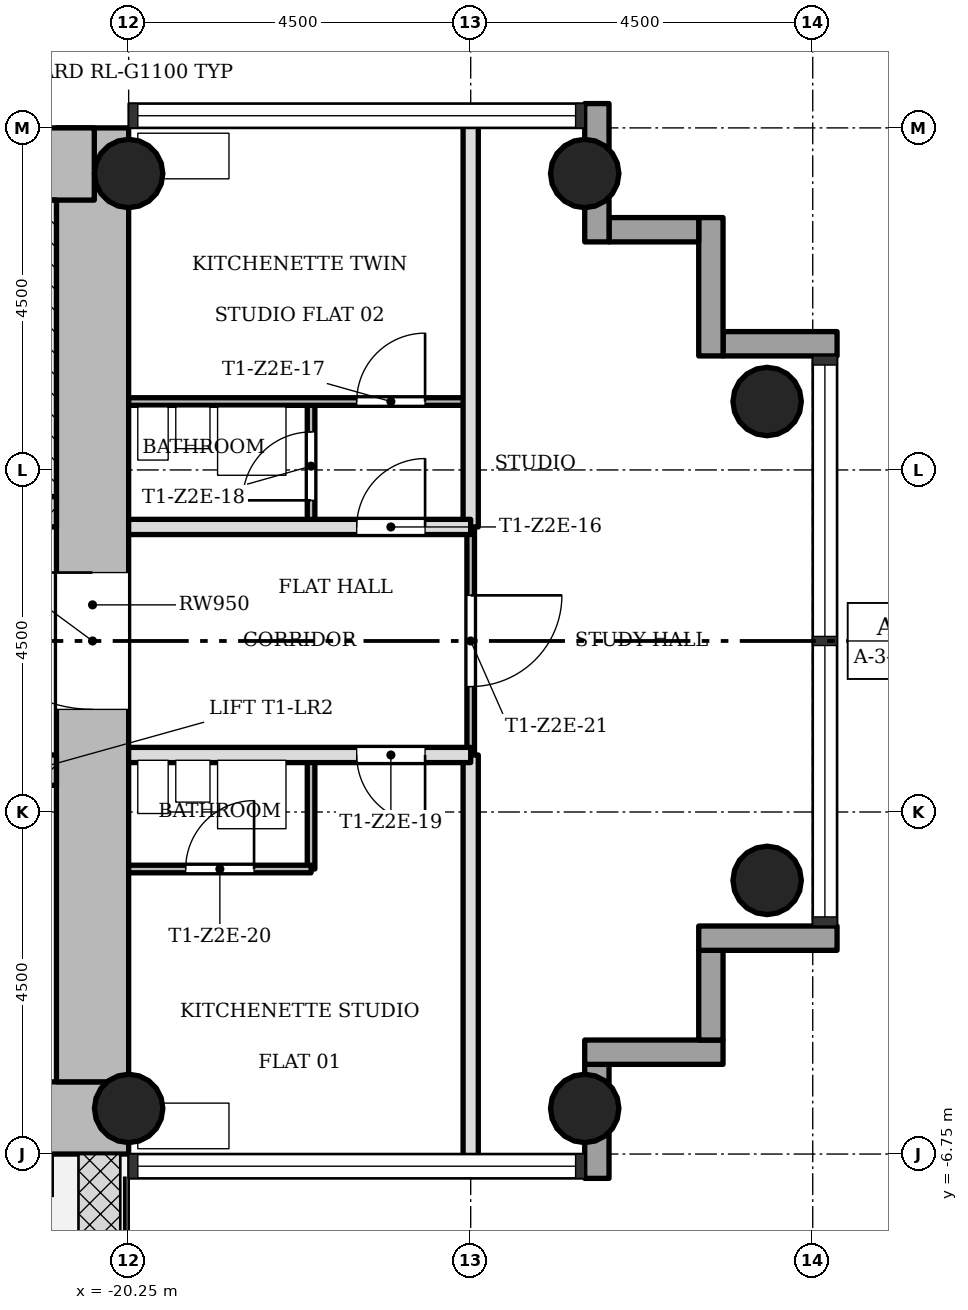
"""IFC4 building model, lengths in metres.
Left out: names, types, materials, properties, quantities, classifications, styles, units other than length and angle.
Written with IfcOpenShell. Run it as: python <this file> out.ifc"""

import sys

from ifc_helpers import new_model, si_unit, direction, frame, frame_2d, origin, origin_2d, place, context, subcontext, project, spatial, rectangle, hollow_circle, extrude, element, fill, save


model = new_model("IFC4")
c1 = context("Model", 3, precision=1e-05, world=origin(), true_north=direction((0.0, 1.0)))
c2 = subcontext(c1, "Body", "Model", "MODEL_VIEW")
j1 = project(units=[si_unit("LENGTHUNIT", "METRE"), si_unit("PLANEANGLEUNIT", "RADIAN")], contexts=[c1])
p1 = place(None, origin())
s1 = spatial("IfcSite", under=j1, at=p1, CompositionType="ELEMENT")
p2 = place(p1, origin())
s2 = spatial("IfcBuilding", under=s1, at=p2, CompositionType="ELEMENT")
p3 = place(p2, frame((0.0, 0.0, 103.8)))
s3 = spatial("IfcBuildingStorey", under=s2, at=p3, CompositionType="ELEMENT", Elevation=103.8)
p4 = place(p3, frame((-28.3, -6.275, 0.0), z_axis=(0.0, 0.0, 1.0), x_axis=(1.0, 0.0, 0.0)))
e1 = element("IfcWall", 1, at=p4, inside=s3, PredefinedType="SHEAR", context=c2, shape_type="SweptSolid", body=[
    extrude(rectangle(XDim=8.05, YDim=0.95, at=frame_2d((4.025, 0.0))), origin(), (0.0, 0.0, 1.0), 3.4),
])
p5 = place(p3, frame((-20.725, -5.8, 0.0), z_axis=(0.0, 0.0, 1.0), x_axis=(0.0, 1.0, 0.0)))
e2 = element("IfcWall", 2, at=p5, inside=s3, PredefinedType="SHEAR", context=c2, shape_type="SweptSolid", body=[
    extrude(rectangle(XDim=12.55, YDim=0.95, at=frame_2d((6.275, 0.0))), origin(), (0.0, 0.0, 1.0), 3.4),
])
p6 = place(p5, frame((4.9, 0.0, 0.0)))
e3 = element("IfcOpeningElement", 3, at=p6, cuts=e2, PredefinedType="OPENING", context=c2, shape_type="SweptSolid", body=[
    extrude(rectangle(XDim=1.8, YDim=2.1, at=frame_2d((0.9, 1.05))), frame((0.0, 0.485, 0.0), z_axis=(0.0, -1.0, 0.0), x_axis=(1.0, 0.0, 0.0)), (0.0, 0.0, 1.0), 0.97),
])
p7 = place(p3, frame((-20.702, 6.275, 0.0), z_axis=(0.0, 0.0, 1.0), x_axis=(-1.0, 0.0, 0.0)))
e4 = element("IfcWall", 4, at=p7, inside=s3, PredefinedType="SHEAR", context=c2, shape_type="SweptSolid", body=[
    extrude(rectangle(XDim=8.696, YDim=0.95, at=frame_2d((4.348, 0.0))), origin(), (0.0, 0.0, 1.0), 3.4),
])
p8 = place(p3, frame((-28.3, -1.7, 0.0), z_axis=(0.0, 0.0, 1.0), x_axis=(1.0, 0.0, 0.0)))
e5 = element("IfcWall", 5, at=p8, inside=s3, PredefinedType="SHEAR", context=c2, shape_type="SweptSolid", body=[
    extrude(rectangle(XDim=7.1, YDim=0.4, at=frame_2d((3.55, 0.0))), origin(), (0.0, 0.0, 1.0), 3.4),
])
p9 = place(p8, frame((0.8, 0.0, 0.0)))
e6 = element("IfcOpeningElement", 6, at=p9, cuts=e5, PredefinedType="OPENING", context=c2, shape_type="SweptSolid", body=[
    extrude(rectangle(XDim=1.1, YDim=2.1, at=frame_2d((0.55, 1.05))), frame((0.0, 0.21, 0.0), z_axis=(0.0, -1.0, 0.0), x_axis=(1.0, 0.0, 0.0)), (0.0, 0.0, 1.0), 0.42),
])
p10 = place(p8, frame((3.0, 0.0, 0.0)))
e7 = element("IfcOpeningElement", 7, at=p10, cuts=e5, PredefinedType="OPENING", context=c2, shape_type="SweptSolid", body=[
    extrude(rectangle(XDim=1.1, YDim=2.1, at=frame_2d((0.55, 1.05))), frame((0.0, 0.21, 0.0), z_axis=(0.0, -1.0, 0.0), x_axis=(1.0, 0.0, 0.0)), (0.0, 0.0, 1.0), 0.42),
])
p11 = place(p8, frame((5.2, 0.0, 0.0)))
e8 = element("IfcOpeningElement", 8, at=p11, cuts=e5, PredefinedType="OPENING", context=c2, shape_type="SweptSolid", body=[
    extrude(rectangle(XDim=1.1, YDim=2.1, at=frame_2d((0.55, 1.05))), frame((0.0, 0.21, 0.0), z_axis=(0.0, -1.0, 0.0), x_axis=(1.0, 0.0, 0.0)), (0.0, 0.0, 1.0), 0.42),
])
p12 = place(p3, frame((-28.3, 1.7, 0.0), z_axis=(0.0, 0.0, 1.0), x_axis=(1.0, 0.0, 0.0)))
e9 = element("IfcWall", 9, at=p12, inside=s3, PredefinedType="SHEAR", context=c2, shape_type="SweptSolid", body=[
    extrude(rectangle(XDim=7.1, YDim=0.4, at=frame_2d((3.55, 0.0))), origin(), (0.0, 0.0, 1.0), 3.4),
])
p13 = place(p12, frame((0.7, 0.0, 0.0)))
e10 = element("IfcOpeningElement", 10, at=p13, cuts=e9, PredefinedType="OPENING", context=c2, shape_type="SweptSolid", body=[
    extrude(rectangle(XDim=0.9, YDim=2.1, at=frame_2d((0.45, 1.05))), frame((0.0, 0.21, 0.0), z_axis=(0.0, -1.0, 0.0), x_axis=(1.0, 0.0, 0.0)), (0.0, 0.0, 1.0), 0.42),
])
for number, where, z_axis, x_axis in (
    (11, (-20.25, -6.15, 0.0), (0.0, 0.0, 1.0), (1.0, 0.0, 0.0)),
    (12, (-20.25, 6.15, 0.0), (0.0, 0.0, 1.0), (1.0, 0.0, 0.0)),
    (13, (-14.25, -6.15, 0.0), (0.0, 0.0, 1.0), (1.0, 0.0, 0.0)),
    (14, (-14.25, 6.15, 0.0), (0.0, 0.0, 1.0), (1.0, 0.0, 0.0)),
    (15, (-11.85, -3.15, 0.0), (0.0, 0.0, 1.0), (1.0, 0.0, 0.0)),
    (16, (-11.85, 3.15, 0.0), (0.0, 0.0, 1.0), (1.0, 0.0, 0.0)),
):
    element("IfcColumn", number, at=place(p3, frame(where, z_axis=z_axis, x_axis=x_axis)), inside=s3, PredefinedType="COLUMN", context=c2, shape_type="SweptSolid", body=[
        extrude(hollow_circle(Radius=0.45, WallThickness=0.032, at=origin_2d()), origin(), (0.0, 0.0, 1.0), 3.4),
    ])
p14 = place(p3, frame((-14.09, -7.07, -0.3), z_axis=(0.0, 0.0, 1.0), x_axis=(0.0, 1.0, 0.0)))
e17 = element("IfcWall", 17, at=p14, inside=s3, PredefinedType="STANDARD", context=c2, shape_type="SweptSolid", body=[
    extrude(rectangle(XDim=1.5, YDim=0.32, at=frame_2d((0.75, 0.0))), origin(), (0.0, 0.0, 1.0), 3.4),
])
p15 = place(p3, frame((-14.25, -5.41, -0.3), z_axis=(0.0, 0.0, 1.0), x_axis=(1.0, 0.0, 0.0)))
e18 = element("IfcWall", 18, at=p15, inside=s3, PredefinedType="STANDARD", context=c2, shape_type="SweptSolid", body=[
    extrude(rectangle(XDim=1.82, YDim=0.32, at=frame_2d((0.91, 0.0))), origin(), (0.0, 0.0, 1.0), 3.4),
])
p16 = place(p3, frame((-12.59, -5.25, -0.3), z_axis=(0.0, 0.0, 1.0), x_axis=(0.0, 1.0, 0.0)))
e19 = element("IfcWall", 19, at=p16, inside=s3, PredefinedType="STANDARD", context=c2, shape_type="SweptSolid", body=[
    extrude(rectangle(XDim=1.18, YDim=0.32, at=frame_2d((0.59, 0.0))), origin(), (0.0, 0.0, 1.0), 3.4),
])
p17 = place(p3, frame((-12.75, -3.91, -0.3), z_axis=(0.0, 0.0, 1.0), x_axis=(1.0, 0.0, 0.0)))
e20 = element("IfcWall", 20, at=p17, inside=s3, PredefinedType="STANDARD", context=c2, shape_type="SweptSolid", body=[
    extrude(rectangle(XDim=1.82, YDim=0.32, at=frame_2d((0.91, 0.0))), origin(), (0.0, 0.0, 1.0), 3.4),
])
p18 = place(p3, frame((-10.93, 3.91, -0.3), z_axis=(0.0, 0.0, 1.0), x_axis=(-1.0, 0.0, 0.0)))
e21 = element("IfcWall", 21, at=p18, inside=s3, PredefinedType="STANDARD", context=c2, shape_type="SweptSolid", body=[
    extrude(rectangle(XDim=1.5, YDim=0.32, at=frame_2d((0.75, 0.0))), origin(), (0.0, 0.0, 1.0), 3.4),
])
p19 = place(p3, frame((-12.59, 3.75, -0.3), z_axis=(0.0, 0.0, 1.0), x_axis=(0.0, 1.0, 0.0)))
e22 = element("IfcWall", 22, at=p19, inside=s3, PredefinedType="STANDARD", context=c2, shape_type="SweptSolid", body=[
    extrude(rectangle(XDim=1.82, YDim=0.32, at=frame_2d((0.91, 0.0))), origin(), (0.0, 0.0, 1.0), 3.4),
])
p20 = place(p3, frame((-12.75, 5.41, -0.3), z_axis=(0.0, 0.0, 1.0), x_axis=(-1.0, 0.0, 0.0)))
e23 = element("IfcWall", 23, at=p20, inside=s3, PredefinedType="STANDARD", context=c2, shape_type="SweptSolid", body=[
    extrude(rectangle(XDim=1.18, YDim=0.32, at=frame_2d((0.59, 0.0))), origin(), (0.0, 0.0, 1.0), 3.4),
])
p21 = place(p3, frame((-14.09, 5.25, -0.3), z_axis=(0.0, 0.0, 1.0), x_axis=(0.0, 1.0, 0.0)))
e24 = element("IfcWall", 24, at=p21, inside=s3, PredefinedType="STANDARD", context=c2, shape_type="SweptSolid", body=[
    extrude(rectangle(XDim=1.82, YDim=0.32, at=frame_2d((0.91, 0.0))), origin(), (0.0, 0.0, 1.0), 3.4),
])
p22 = place(p3, frame((-17.85, -3.0, 0.0), z_axis=(0.0, 0.0, 1.0), x_axis=(0.0, 1.0, 0.0)))
e25 = element("IfcWall", 25, at=p22, inside=s3, PredefinedType="PARTITIONING", context=c2, shape_type="SweptSolid", body=[
    extrude(rectangle(XDim=1.5, YDim=0.1, at=frame_2d((0.75, 0.0))), origin(), (0.0, 0.0, 1.0), 3.0),
])
p23 = place(p3, frame((-17.85, 1.5, 0.0), z_axis=(0.0, 0.0, 1.0), x_axis=(0.0, 1.0, 0.0)))
e26 = element("IfcWall", 26, at=p23, inside=s3, PredefinedType="PARTITIONING", context=c2, shape_type="SweptSolid", body=[
    extrude(rectangle(XDim=1.65, YDim=0.1, at=frame_2d((0.825, 0.0))), origin(), (0.0, 0.0, 1.0), 3.0),
])
p24 = place(p23, frame((0.35, 0.0, 0.0)))
e27 = element("IfcOpeningElement", 27, at=p24, cuts=e26, PredefinedType="OPENING", context=c2, shape_type="SweptSolid", body=[
    extrude(rectangle(XDim=0.9, YDim=2.1, at=frame_2d((0.45, 1.05))), frame((0.0, 0.06, 0.0), z_axis=(0.0, -1.0, 0.0), x_axis=(1.0, 0.0, 0.0)), (0.0, 0.0, 1.0), 0.12),
])
p25 = place(p3, frame((-15.75, -1.5, 0.0), z_axis=(0.0, 0.0, 1.0), x_axis=(0.0, 1.0, 0.0)))
e28 = element("IfcWall", 28, at=p25, inside=s3, PredefinedType="PARTITIONING", context=c2, shape_type="SweptSolid", body=[
    extrude(rectangle(XDim=3.0, YDim=0.1, at=frame_2d((1.5, 0.0))), origin(), (0.0, 0.0, 1.0), 3.0),
])
p26 = place(p25, frame((0.9, 0.0, 0.0)))
e29 = element("IfcOpeningElement", 29, at=p26, cuts=e28, PredefinedType="OPENING", context=c2, shape_type="SweptSolid", body=[
    extrude(rectangle(XDim=1.2, YDim=2.1, at=frame_2d((0.6, 1.05))), frame((0.0, 0.06, 0.0), z_axis=(0.0, -1.0, 0.0), x_axis=(1.0, 0.0, 0.0)), (0.0, 0.0, 1.0), 0.12),
])
for number, where, z_axis, x_axis in (
    (30, (-15.75, -6.85, 0.0), (0.0, 0.0, 1.0), (0.0, 1.0, 0.0)),
    (31, (-15.75, 1.5, 0.0), (0.0, 0.0, 1.0), (0.0, 1.0, 0.0)),
):
    element("IfcWall", number, at=place(p3, frame(where, z_axis=z_axis, x_axis=x_axis)), inside=s3, PredefinedType="SOLIDWALL", context=c2, shape_type="SweptSolid", body=[
        extrude(rectangle(XDim=5.35, YDim=0.2, at=frame_2d((2.675, 0.0))), origin(), (0.0, 0.0, 1.0), 3.0),
    ])
p27 = place(p3, frame((-20.25, -3.0, 0.0), z_axis=(0.0, 0.0, 1.0), x_axis=(1.0, 0.0, 0.0)))
e32 = element("IfcWall", 32, at=p27, inside=s3, PredefinedType="PARTITIONING", context=c2, shape_type="SweptSolid", body=[
    extrude(rectangle(XDim=2.4, YDim=0.1, at=frame_2d((1.2, 0.0))), origin(), (0.0, 0.0, 1.0), 3.0),
])
p28 = place(p27, frame((0.75, 0.0, 0.0)))
e33 = element("IfcOpeningElement", 33, at=p28, cuts=e32, PredefinedType="OPENING", context=c2, shape_type="SweptSolid", body=[
    extrude(rectangle(XDim=0.9, YDim=2.1, at=frame_2d((0.45, 1.05))), frame((0.0, 0.06, 0.0), z_axis=(0.0, -1.0, 0.0), x_axis=(1.0, 0.0, 0.0)), (0.0, 0.0, 1.0), 0.12),
])
p29 = place(p3, frame((-20.25, -1.5, 0.0), z_axis=(0.0, 0.0, 1.0), x_axis=(1.0, 0.0, 0.0)))
e34 = element("IfcWall", 34, at=p29, inside=s3, PredefinedType="SOLIDWALL", context=c2, shape_type="SweptSolid", body=[
    extrude(rectangle(XDim=4.5, YDim=0.2, at=frame_2d((2.25, 0.0))), origin(), (0.0, 0.0, 1.0), 3.0),
])
p30 = place(p29, frame((3.0, 0.0, 0.0)))
e35 = element("IfcOpeningElement", 35, at=p30, cuts=e34, PredefinedType="OPENING", context=c2, shape_type="SweptSolid", body=[
    extrude(rectangle(XDim=0.9, YDim=2.1, at=frame_2d((0.45, 1.05))), frame((0.0, 0.11, 0.0), z_axis=(0.0, -1.0, 0.0), x_axis=(1.0, 0.0, 0.0)), (0.0, 0.0, 1.0), 0.22),
])
p31 = place(p3, frame((-20.25, 1.5, 0.0), z_axis=(0.0, 0.0, 1.0), x_axis=(1.0, 0.0, 0.0)))
e36 = element("IfcWall", 36, at=p31, inside=s3, PredefinedType="SOLIDWALL", context=c2, shape_type="SweptSolid", body=[
    extrude(rectangle(XDim=4.5, YDim=0.2, at=frame_2d((2.25, 0.0))), origin(), (0.0, 0.0, 1.0), 3.0),
])
p32 = place(p31, frame((3.0, 0.0, 0.0)))
e37 = element("IfcOpeningElement", 37, at=p32, cuts=e36, PredefinedType="OPENING", context=c2, shape_type="SweptSolid", body=[
    extrude(rectangle(XDim=0.9, YDim=2.1, at=frame_2d((0.45, 1.05))), frame((0.0, 0.11, 0.0), z_axis=(0.0, -1.0, 0.0), x_axis=(1.0, 0.0, 0.0)), (0.0, 0.0, 1.0), 0.22),
])
p33 = place(p3, frame((-20.25, 3.15, 0.0), z_axis=(0.0, 0.0, 1.0), x_axis=(1.0, 0.0, 0.0)))
e38 = element("IfcWall", 38, at=p33, inside=s3, PredefinedType="PARTITIONING", context=c2, shape_type="SweptSolid", body=[
    extrude(rectangle(XDim=4.5, YDim=0.1, at=frame_2d((2.25, 0.0))), origin(), (0.0, 0.0, 1.0), 3.0),
])
p34 = place(p33, frame((3.0, 0.0, 0.0)))
e39 = element("IfcOpeningElement", 39, at=p34, cuts=e38, PredefinedType="OPENING", context=c2, shape_type="SweptSolid", body=[
    extrude(rectangle(XDim=0.9, YDim=2.1, at=frame_2d((0.45, 1.05))), frame((0.0, 0.06, 0.0), z_axis=(0.0, -1.0, 0.0), x_axis=(1.0, 0.0, 0.0)), (0.0, 0.0, 1.0), 0.12),
])
p35 = place(p3, frame((-21.325, 1.9, 0.0), z_axis=(0.0, 0.0, 1.0), x_axis=(0.0, 1.0, 0.0)))
e40 = element("IfcWall", 40, at=p35, inside=s3, PredefinedType="SHEAR", context=c2, shape_type="SweptSolid", body=[
    extrude(rectangle(XDim=3.9, YDim=0.25, at=frame_2d((1.95, 0.0))), origin(), (0.0, 0.0, 1.0), 3.4),
])
p36 = place(p32, origin())
e41 = element("IfcDoor", 41, at=p36, inside=s3, OperationType="SINGLE_SWING_LEFT", PredefinedType="DOOR", context=c2, shape_type="SweptSolid", body=[
    extrude(rectangle(XDim=0.9, YDim=2.1, at=frame_2d((0.45, 1.05))), frame((0.0, 0.025, 0.0), z_axis=(0.0, -1.0, 0.0), x_axis=(1.0, 0.0, 0.0)), (0.0, 0.0, 1.0), 0.05),
])
fill(e37, e41)
p37 = place(p34, origin())
e42 = element("IfcDoor", 42, at=p37, inside=s3, OperationType="SINGLE_SWING_LEFT", PredefinedType="DOOR", context=c2, shape_type="SweptSolid", body=[
    extrude(rectangle(XDim=0.9, YDim=2.1, at=frame_2d((0.45, 1.05))), frame((0.0, 0.025, 0.0), z_axis=(0.0, -1.0, 0.0), x_axis=(1.0, 0.0, 0.0)), (0.0, 0.0, 1.0), 0.05),
])
fill(e39, e42)
p38 = place(p24, origin())
e43 = element("IfcDoor", 43, at=p38, inside=s3, OperationType="SINGLE_SWING_RIGHT", PredefinedType="DOOR", context=c2, shape_type="SweptSolid", body=[
    extrude(rectangle(XDim=0.9, YDim=2.1, at=frame_2d((0.45, 1.05))), frame((0.0, 0.025, 0.0), z_axis=(0.0, -1.0, 0.0), x_axis=(1.0, 0.0, 0.0)), (0.0, 0.0, 1.0), 0.05),
])
fill(e27, e43)
p39 = place(p30, origin())
e44 = element("IfcDoor", 44, at=p39, inside=s3, OperationType="SINGLE_SWING_RIGHT", PredefinedType="DOOR", context=c2, shape_type="SweptSolid", body=[
    extrude(rectangle(XDim=0.9, YDim=2.1, at=frame_2d((0.45, 1.05))), frame((0.0, 0.025, 0.0), z_axis=(0.0, -1.0, 0.0), x_axis=(1.0, 0.0, 0.0)), (0.0, 0.0, 1.0), 0.05),
])
fill(e35, e44)
p40 = place(p28, origin())
e45 = element("IfcDoor", 45, at=p40, inside=s3, OperationType="SINGLE_SWING_LEFT", PredefinedType="DOOR", context=c2, shape_type="SweptSolid", body=[
    extrude(rectangle(XDim=0.9, YDim=2.1, at=frame_2d((0.45, 1.05))), frame((0.0, 0.025, 0.0), z_axis=(0.0, -1.0, 0.0), x_axis=(1.0, 0.0, 0.0)), (0.0, 0.0, 1.0), 0.05),
])
fill(e33, e45)
p41 = place(p26, origin())
e46 = element("IfcDoor", 46, at=p41, inside=s3, OperationType="SINGLE_SWING_RIGHT", PredefinedType="DOOR", context=c2, shape_type="SweptSolid", body=[
    extrude(rectangle(XDim=1.2, YDim=2.1, at=frame_2d((0.6, 1.05))), frame((0.0, 0.025, 0.0), z_axis=(0.0, -1.0, 0.0), x_axis=(1.0, 0.0, 0.0)), (0.0, 0.0, 1.0), 0.05),
])
fill(e29, e46)
p42 = place(p6, origin())
e47 = element("IfcDoor", 47, at=p42, inside=s3, OperationType="SINGLE_SWING_LEFT", PredefinedType="DOOR", context=c2, shape_type="SweptSolid", body=[
    extrude(rectangle(XDim=1.8, YDim=2.1, at=frame_2d((0.9, 1.05))), frame((0.0, 0.025, 0.0), z_axis=(0.0, -1.0, 0.0), x_axis=(1.0, 0.0, 0.0)), (0.0, 0.0, 1.0), 0.05),
])
fill(e3, e47)
save(model, sys.argv[1])
